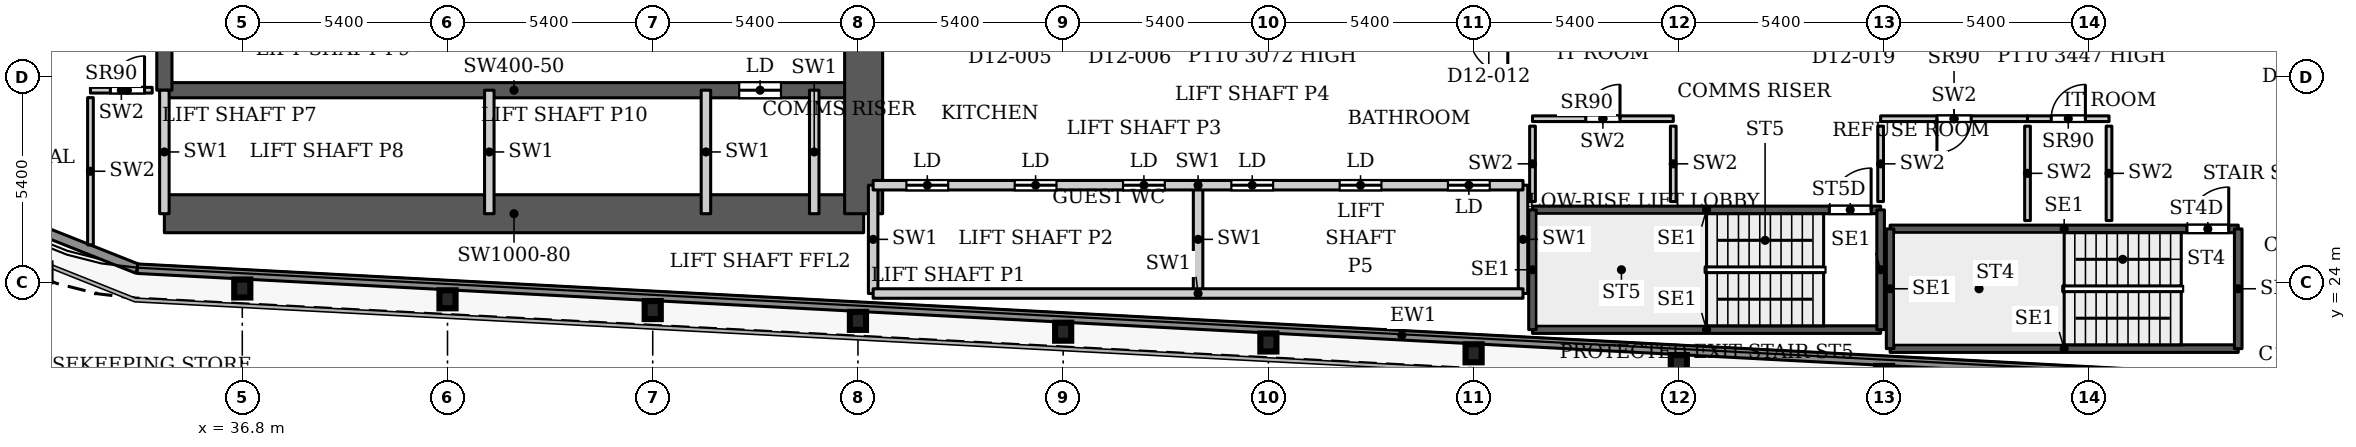
"""IFC4 building model, lengths in metres.
Left out: names, types, materials, properties, quantities, classifications, styles, units other than length and angle.
Written with IfcOpenShell. Run it as: python <this file> out.ifc"""

import sys

from ifc_helpers import new_model, si_unit, direction, frame, frame_2d, origin, origin_2d, place, context, subcontext, project, spatial, rectangle, i_section, extrude, source, transform, mapped, element, fill, save


model = new_model("IFC4")
c1 = context("Model", 3, precision=1e-05, world=origin(), true_north=direction((0.0, 1.0)))
c2 = subcontext(c1, "Body", "Model", "MODEL_VIEW")
j1 = project(units=[si_unit("LENGTHUNIT", "METRE"), si_unit("PLANEANGLEUNIT", "RADIAN")], contexts=[c1])
p1 = place(None, origin())
s1 = spatial("IfcSite", under=j1, at=p1, CompositionType="ELEMENT")
p2 = place(p1, origin())
s2 = spatial("IfcBuilding", under=s1, at=p2, CompositionType="ELEMENT")
p3 = place(p2, frame((0.0, 0.0, 57.8)))
s3 = spatial("IfcBuildingStorey", under=s2, at=p3, CompositionType="ELEMENT", Elevation=57.8)
for number, where, z_axis, x_axis in (
    (1, (80.0, 21.558, 0.0), (0.0, 0.0, 1.0), (1.0, 0.0, 0.0)),
    (2, (74.6, 21.843, 0.0), (0.0, 0.0, 1.0), (1.0, 0.0, 0.0)),
    (3, (69.2, 22.127, 0.0), (0.0, 0.0, 1.0), (1.0, 0.0, 0.0)),
    (4, (63.8, 22.411, 0.0), (0.0, 0.0, 1.0), (1.0, 0.0, 0.0)),
    (5, (58.4, 22.695, 0.0), (0.0, 0.0, 1.0), (1.0, 0.0, 0.0)),
    (6, (53.0, 22.98, 0.0), (0.0, 0.0, 1.0), (1.0, 0.0, 0.0)),
    (7, (47.6, 23.264, 0.0), (0.0, 0.0, 1.0), (1.0, 0.0, 0.0)),
    (8, (42.2, 23.548, 0.0), (0.0, 0.0, 1.0), (1.0, 0.0, 0.0)),
    (9, (36.8, 23.832, 0.0), (0.0, 0.0, 1.0), (1.0, 0.0, 0.0)),
):
    element("IfcColumn", number, at=place(p3, frame(where, z_axis=z_axis, x_axis=x_axis)), inside=s3, PredefinedType="COLUMN", context=c2, shape_type="SweptSolid", body=[
        extrude(i_section(OverallWidth=0.424, OverallDepth=0.474, WebThickness=0.048, FlangeThickness=0.077, FilletRadius=0.014, at=origin_2d()), origin(), (0.0, 0.0, 1.0), 3.9),
    ])
p4 = place(p3, frame((34.75, 25.8, 0.0), z_axis=(0.0, 0.0, 1.0), x_axis=(1.0, 0.0, 0.0)))
e10 = element("IfcWall", 10, at=p4, inside=s3, PredefinedType="SHEAR", context=c2, shape_type="SweptSolid", body=[
    extrude(rectangle(XDim=18.4, YDim=1.0, at=frame_2d((9.2, 0.0))), origin(), (0.0, 0.0, 1.0), 3.9),
])
p5 = place(p3, frame((34.75, 29.05, 0.0), z_axis=(0.0, 0.0, 1.0), x_axis=(1.0, 0.0, 0.0)))
e11 = element("IfcWall", 11, at=p5, inside=s3, PredefinedType="SHEAR", context=c2, shape_type="SweptSolid", body=[
    extrude(rectangle(XDim=18.4, YDim=0.4, at=frame_2d((9.2, 0.0))), origin(), (0.0, 0.0, 1.0), 3.9),
])
p6 = place(p5, frame((15.125, 0.0, 0.0)))
e12 = element("IfcOpeningElement", 12, at=p6, cuts=e11, PredefinedType="OPENING", context=c2, shape_type="SweptSolid", body=[
    extrude(rectangle(XDim=1.1, YDim=2.2, at=frame_2d((0.55, 1.1))), frame((0.0, 0.21, 0.0), z_axis=(0.0, -1.0, 0.0), x_axis=(1.0, 0.0, 0.0)), (0.0, 0.0, 1.0), 0.42),
])
p7 = place(p3, frame((34.75, 29.05, 0.0), z_axis=(0.0, 0.0, 1.0), x_axis=(0.0, 1.0, 0.0)))
e13 = element("IfcWall", 13, at=p7, inside=s3, PredefinedType="SHEAR", context=c2, shape_type="SweptSolid", body=[
    extrude(rectangle(XDim=18.45, YDim=0.4, at=frame_2d((9.225, 0.0))), origin(), (0.0, 0.0, 1.0), 3.9),
])
p8 = place(p7, frame((8.025, 0.0, 0.0)))
e14 = element("IfcOpeningElement", 14, at=p8, cuts=e13, PredefinedType="OPENING", context=c2, shape_type="SweptSolid", body=[
    extrude(rectangle(XDim=1.1, YDim=2.2, at=frame_2d((0.55, 1.1))), frame((0.0, 0.21, 0.0), z_axis=(0.0, -1.0, 0.0), x_axis=(1.0, 0.0, 0.0)), (0.0, 0.0, 1.0), 0.42),
])
p9 = place(p7, frame((10.875, 0.0, 0.0)))
e15 = element("IfcOpeningElement", 15, at=p9, cuts=e13, PredefinedType="OPENING", context=c2, shape_type="SweptSolid", body=[
    extrude(rectangle(XDim=1.1, YDim=2.2, at=frame_2d((0.55, 1.1))), frame((0.0, 0.21, 0.0), z_axis=(0.0, -1.0, 0.0), x_axis=(1.0, 0.0, 0.0)), (0.0, 0.0, 1.0), 0.42),
])
p10 = place(p7, frame((13.725, 0.0, 0.0)))
e16 = element("IfcOpeningElement", 16, at=p10, cuts=e13, PredefinedType="OPENING", context=c2, shape_type="SweptSolid", body=[
    extrude(rectangle(XDim=1.1, YDim=2.2, at=frame_2d((0.55, 1.1))), frame((0.0, 0.21, 0.0), z_axis=(0.0, -1.0, 0.0), x_axis=(1.0, 0.0, 0.0)), (0.0, 0.0, 1.0), 0.42),
])
p11 = place(p7, frame((15.95, 0.0, 0.0)))
e17 = element("IfcOpeningElement", 17, at=p11, cuts=e13, PredefinedType="OPENING", context=c2, shape_type="SweptSolid", body=[
    extrude(rectangle(XDim=1.1, YDim=2.2, at=frame_2d((0.55, 1.1))), frame((0.0, 0.21, 0.0), z_axis=(0.0, -1.0, 0.0), x_axis=(1.0, 0.0, 0.0)), (0.0, 0.0, 1.0), 0.42),
])
p12 = place(p3, frame((53.15, 25.8, 0.0), z_axis=(0.0, 0.0, 1.0), x_axis=(0.0, 1.0, 0.0)))
e18 = element("IfcWall", 18, at=p12, inside=s3, PredefinedType="SHEAR", context=c2, shape_type="SweptSolid", body=[
    extrude(rectangle(XDim=10.4, YDim=1.0, at=frame_2d((5.2, 0.0))), origin(), (0.0, 0.0, 1.0), 3.9),
])
p13 = place(p3, frame((34.039, 24.353, 0.0), z_axis=(0.0, 0.0, 1.0), x_axis=(-0.929352825399, 0.369192803184, 0.0)))
e19 = element("IfcWall", 19, at=p13, inside=s3, PredefinedType="SOLIDWALL", context=c2, shape_type="SweptSolid", body=[
    extrude(rectangle(XDim=4.656, YDim=0.25, at=frame_2d((2.328, 0.0))), origin(), (0.0, 0.0, 1.0), 3.75),
])
p14 = place(p3, frame((100.586, 20.85, 0.0), z_axis=(0.0, 0.0, 1.0), x_axis=(-0.99861746497, 0.052565755559, 0.0)))
e20 = element("IfcWall", 20, at=p14, inside=s3, PredefinedType="SOLIDWALL", context=c2, shape_type="SweptSolid", body=[
    extrude(rectangle(XDim=66.639, YDim=0.25, at=frame_2d((33.319, 0.0))), origin(), (0.0, 0.0, 1.0), 3.75),
])
p15 = place(p3, frame((80.16, 22.25, 0.0), z_axis=(0.0, 0.0, 1.0), x_axis=(1.0, 0.0, 0.0)))
e21 = element("IfcWall", 21, at=p15, inside=s3, PredefinedType="SHEAR", context=c2, shape_type="SweptSolid", body=[
    extrude(rectangle(XDim=9.16, YDim=0.2, at=frame_2d((4.58, 0.0))), origin(), (0.0, 0.0, 1.0), 3.9),
])
p16 = place(p3, frame((80.16, 25.4, 0.0), z_axis=(0.0, 0.0, 1.0), x_axis=(1.0, 0.0, 0.0)))
e22 = element("IfcWall", 22, at=p16, inside=s3, PredefinedType="SHEAR", context=c2, shape_type="SweptSolid", body=[
    extrude(rectangle(XDim=9.16, YDim=0.2, at=frame_2d((4.58, 0.0))), origin(), (0.0, 0.0, 1.0), 3.9),
])
p17 = place(p16, frame((7.81, 0.0, 0.0)))
e23 = element("IfcOpeningElement", 23, at=p17, cuts=e22, PredefinedType="OPENING", context=c2, shape_type="SweptSolid", body=[
    extrude(rectangle(XDim=1.1, YDim=2.2, at=frame_2d((0.55, 1.1))), frame((0.0, 0.11, 0.0), z_axis=(0.0, -1.0, 0.0), x_axis=(1.0, 0.0, 0.0)), (0.0, 0.0, 1.0), 0.22),
])
for number, where, z_axis, x_axis in (
    (24, (80.16, 22.25, 0.0), (0.0, 0.0, 1.0), (0.0, 1.0, 0.0)),
    (25, (89.32, 22.25, 0.0), (0.0, 0.0, 1.0), (0.0, 1.0, 0.0)),
):
    element("IfcWall", number, at=place(p3, frame(where, z_axis=z_axis, x_axis=x_axis)), inside=s3, PredefinedType="SHEAR", context=c2, shape_type="SweptSolid", body=[
        extrude(rectangle(XDim=3.15, YDim=0.2, at=frame_2d((1.575, 0.0))), origin(), (0.0, 0.0, 1.0), 3.9),
    ])
p18 = place(p3, frame((70.75, 22.75, 0.0), z_axis=(0.0, 0.0, 1.0), x_axis=(1.0, 0.0, 0.0)))
e26 = element("IfcWall", 26, at=p18, inside=s3, PredefinedType="SHEAR", context=c2, shape_type="SweptSolid", body=[
    extrude(rectangle(XDim=9.16, YDim=0.2, at=frame_2d((4.58, 0.0))), origin(), (0.0, 0.0, 1.0), 3.9),
])
p19 = place(p3, frame((70.75, 25.9, 0.0), z_axis=(0.0, 0.0, 1.0), x_axis=(1.0, 0.0, 0.0)))
e27 = element("IfcWall", 27, at=p19, inside=s3, PredefinedType="SHEAR", context=c2, shape_type="SweptSolid", body=[
    extrude(rectangle(XDim=9.16, YDim=0.2, at=frame_2d((4.58, 0.0))), origin(), (0.0, 0.0, 1.0), 3.9),
])
p20 = place(p19, frame((7.81, 0.0, 0.0)))
e28 = element("IfcOpeningElement", 28, at=p20, cuts=e27, PredefinedType="OPENING", context=c2, shape_type="SweptSolid", body=[
    extrude(rectangle(XDim=1.1, YDim=2.2, at=frame_2d((0.55, 1.1))), frame((0.0, 0.11, 0.0), z_axis=(0.0, -1.0, 0.0), x_axis=(1.0, 0.0, 0.0)), (0.0, 0.0, 1.0), 0.22),
])
for number, where, z_axis, x_axis in (
    (29, (70.75, 22.75, 0.0), (0.0, 0.0, 1.0), (0.0, 1.0, 0.0)),
    (30, (79.91, 22.75, 0.0), (0.0, 0.0, 1.0), (0.0, 1.0, 0.0)),
):
    element("IfcWall", number, at=place(p3, frame(where, z_axis=z_axis, x_axis=x_axis)), inside=s3, PredefinedType="SHEAR", context=c2, shape_type="SweptSolid", body=[
        extrude(rectangle(XDim=3.15, YDim=0.2, at=frame_2d((1.575, 0.0))), origin(), (0.0, 0.0, 1.0), 3.9),
    ])
for number, where, z_axis, x_axis in (
    (31, (34.75, 25.8, 0.0), (0.0, 0.0, 1.0), (0.0, 1.0, 0.0)),
    (32, (43.3, 25.8, 0.0), (0.0, 0.0, 1.0), (0.0, 1.0, 0.0)),
    (33, (49.0, 25.8, 0.0), (0.0, 0.0, 1.0), (0.0, 1.0, 0.0)),
    (34, (51.85, 25.8, 0.0), (0.0, 0.0, 1.0), (0.0, 1.0, 0.0)),
):
    element("IfcWall", number, at=place(p3, frame(where, z_axis=z_axis, x_axis=x_axis)), inside=s3, PredefinedType="PARTITIONING", context=c2, shape_type="SweptSolid", body=[
        extrude(rectangle(XDim=3.25, YDim=0.25, at=frame_2d((1.625, 0.0))), origin(), (0.0, 0.0, 1.0), 3.9),
    ])
for number, where, z_axis, x_axis in (
    (35, (53.4, 23.7, 0.0), (0.0, 0.0, 1.0), (0.0, 1.0, 0.0)),
    (36, (61.95, 23.7, 0.0), (0.0, 0.0, 1.0), (0.0, 1.0, 0.0)),
    (37, (70.5, 23.7, 0.0), (0.0, 0.0, 1.0), (0.0, 1.0, 0.0)),
):
    element("IfcWall", number, at=place(p3, frame(where, z_axis=z_axis, x_axis=x_axis)), inside=s3, PredefinedType="PARTITIONING", context=c2, shape_type="SweptSolid", body=[
        extrude(rectangle(XDim=2.85, YDim=0.25, at=frame_2d((1.425, 0.0))), origin(), (0.0, 0.0, 1.0), 3.9),
    ])
p21 = place(p3, frame((53.4, 23.7, 0.0), z_axis=(0.0, 0.0, 1.0), x_axis=(1.0, 0.0, 0.0)))
e38 = element("IfcWall", 38, at=p21, inside=s3, PredefinedType="PARTITIONING", context=c2, shape_type="SweptSolid", body=[
    extrude(rectangle(XDim=17.1, YDim=0.25, at=frame_2d((8.55, 0.0))), origin(), (0.0, 0.0, 1.0), 3.9),
])
p22 = place(p3, frame((53.4, 26.55, 0.0), z_axis=(0.0, 0.0, 1.0), x_axis=(1.0, 0.0, 0.0)))
e39 = element("IfcWall", 39, at=p22, inside=s3, PredefinedType="PARTITIONING", context=c2, shape_type="SweptSolid", body=[
    extrude(rectangle(XDim=17.1, YDim=0.25, at=frame_2d((8.55, 0.0))), origin(), (0.0, 0.0, 1.0), 3.9),
])
p23 = place(p22, frame((0.875, 0.0, 0.0)))
e40 = element("IfcOpeningElement", 40, at=p23, cuts=e39, PredefinedType="OPENING", context=c2, shape_type="SweptSolid", body=[
    extrude(rectangle(XDim=1.1, YDim=2.2, at=frame_2d((0.55, 1.1))), frame((0.0, 0.135, 0.0), z_axis=(0.0, -1.0, 0.0), x_axis=(1.0, 0.0, 0.0)), (0.0, 0.0, 1.0), 0.27),
])
p24 = place(p22, frame((3.725, 0.0, 0.0)))
e41 = element("IfcOpeningElement", 41, at=p24, cuts=e39, PredefinedType="OPENING", context=c2, shape_type="SweptSolid", body=[
    extrude(rectangle(XDim=1.1, YDim=2.2, at=frame_2d((0.55, 1.1))), frame((0.0, 0.135, 0.0), z_axis=(0.0, -1.0, 0.0), x_axis=(1.0, 0.0, 0.0)), (0.0, 0.0, 1.0), 0.27),
])
p25 = place(p22, frame((6.575, 0.0, 0.0)))
e42 = element("IfcOpeningElement", 42, at=p25, cuts=e39, PredefinedType="OPENING", context=c2, shape_type="SweptSolid", body=[
    extrude(rectangle(XDim=1.1, YDim=2.2, at=frame_2d((0.55, 1.1))), frame((0.0, 0.135, 0.0), z_axis=(0.0, -1.0, 0.0), x_axis=(1.0, 0.0, 0.0)), (0.0, 0.0, 1.0), 0.27),
])
p26 = place(p22, frame((9.425, 0.0, 0.0)))
e43 = element("IfcOpeningElement", 43, at=p26, cuts=e39, PredefinedType="OPENING", context=c2, shape_type="SweptSolid", body=[
    extrude(rectangle(XDim=1.1, YDim=2.2, at=frame_2d((0.55, 1.1))), frame((0.0, 0.135, 0.0), z_axis=(0.0, -1.0, 0.0), x_axis=(1.0, 0.0, 0.0)), (0.0, 0.0, 1.0), 0.27),
])
p27 = place(p22, frame((12.275, 0.0, 0.0)))
e44 = element("IfcOpeningElement", 44, at=p27, cuts=e39, PredefinedType="OPENING", context=c2, shape_type="SweptSolid", body=[
    extrude(rectangle(XDim=1.1, YDim=2.2, at=frame_2d((0.55, 1.1))), frame((0.0, 0.135, 0.0), z_axis=(0.0, -1.0, 0.0), x_axis=(1.0, 0.0, 0.0)), (0.0, 0.0, 1.0), 0.27),
])
p28 = place(p22, frame((15.125, 0.0, 0.0)))
e45 = element("IfcOpeningElement", 45, at=p28, cuts=e39, PredefinedType="OPENING", context=c2, shape_type="SweptSolid", body=[
    extrude(rectangle(XDim=1.1, YDim=2.2, at=frame_2d((0.55, 1.1))), frame((0.0, 0.135, 0.0), z_axis=(0.0, -1.0, 0.0), x_axis=(1.0, 0.0, 0.0)), (0.0, 0.0, 1.0), 0.27),
])
p29 = place(p3, frame((32.805, 29.05, 0.0), z_axis=(0.0, 0.0, 1.0), x_axis=(1.0, 0.0, 0.0)))
e46 = element("IfcWall", 46, at=p29, inside=s3, PredefinedType="PARTITIONING", context=c2, shape_type="SweptSolid", body=[
    extrude(rectangle(XDim=1.625, YDim=0.15, at=frame_2d((0.812, 0.0))), origin(), (0.0, 0.0, 1.0), 3.9),
])
p30 = place(p29, frame((0.523, 0.0, 0.0)))
e47 = element("IfcOpeningElement", 47, at=p30, cuts=e46, PredefinedType="OPENING", context=c2, shape_type="SweptSolid", body=[
    extrude(rectangle(XDim=0.9, YDim=2.2, at=frame_2d((0.45, 1.1))), frame((0.0, 0.085, 0.0), z_axis=(0.0, -1.0, 0.0), x_axis=(1.0, 0.0, 0.0)), (0.0, 0.0, 1.0), 0.17),
])
p31 = place(p3, frame((32.805, 24.98, 0.0), z_axis=(0.0, 0.0, 1.0), x_axis=(0.0, 1.0, 0.0)))
e48 = element("IfcWall", 48, at=p31, inside=s3, PredefinedType="PARTITIONING", context=c2, shape_type="SweptSolid", body=[
    extrude(rectangle(XDim=3.875, YDim=0.15, at=frame_2d((1.938, 0.0))), origin(), (0.0, 0.0, 1.0), 3.9),
])
p32 = place(p3, frame((70.75, 28.3, 0.0), z_axis=(0.0, 0.0, 1.0), x_axis=(1.0, 0.0, 0.0)))
e49 = element("IfcWall", 49, at=p32, inside=s3, PredefinedType="PARTITIONING", context=c2, shape_type="SweptSolid", body=[
    extrude(rectangle(XDim=3.704, YDim=0.15, at=frame_2d((1.852, 0.0))), origin(), (0.0, 0.0, 1.0), 3.9),
])
p33 = place(p32, frame((1.402, 0.0, 0.0)))
e50 = element("IfcOpeningElement", 50, at=p33, cuts=e49, PredefinedType="OPENING", context=c2, shape_type="SweptSolid", body=[
    extrude(rectangle(XDim=0.9, YDim=2.2, at=frame_2d((0.45, 1.1))), frame((0.0, 0.085, 0.0), z_axis=(0.0, -1.0, 0.0), x_axis=(1.0, 0.0, 0.0)), (0.0, 0.0, 1.0), 0.17),
])
for number, where, z_axis, x_axis in (
    (51, (70.75, 26.12, 0.0), (0.0, 0.0, 1.0), (0.0, 1.0, 0.0)),
    (52, (74.454, 26.12, 0.0), (0.0, 0.0, 1.0), (0.0, 1.0, 0.0)),
):
    element("IfcWall", number, at=place(p3, frame(where, z_axis=z_axis, x_axis=x_axis)), inside=s3, PredefinedType="PARTITIONING", context=c2, shape_type="SweptSolid", body=[
        extrude(rectangle(XDim=1.985, YDim=0.15, at=frame_2d((0.992, 0.0))), origin(), (0.0, 0.0, 1.0), 3.9),
    ])
p34 = place(p3, frame((79.91, 28.3, 0.0), z_axis=(0.0, 0.0, 1.0), x_axis=(1.0, 0.0, 0.0)))
e53 = element("IfcWall", 53, at=p34, inside=s3, PredefinedType="PARTITIONING", context=c2, shape_type="SweptSolid", body=[
    extrude(rectangle(XDim=3.865, YDim=0.15, at=frame_2d((1.933, 0.0))), origin(), (0.0, 0.0, 1.0), 3.9),
])
p35 = place(p34, frame((1.482, 0.0, 0.0)))
e54 = element("IfcOpeningElement", 54, at=p35, cuts=e53, PredefinedType="OPENING", context=c2, shape_type="SweptSolid", body=[
    extrude(rectangle(XDim=0.9, YDim=2.2, at=frame_2d((0.45, 1.1))), frame((0.0, 0.085, 0.0), z_axis=(0.0, -1.0, 0.0), x_axis=(1.0, 0.0, 0.0)), (0.0, 0.0, 1.0), 0.17),
])
p36 = place(p3, frame((79.91, 26.12, 0.0), z_axis=(0.0, 0.0, 1.0), x_axis=(0.0, 1.0, 0.0)))
e55 = element("IfcWall", 55, at=p36, inside=s3, PredefinedType="PARTITIONING", context=c2, shape_type="SweptSolid", body=[
    extrude(rectangle(XDim=1.985, YDim=0.15, at=frame_2d((0.992, 0.0))), origin(), (0.0, 0.0, 1.0), 3.9),
])
p37 = place(p3, frame((83.775, 25.62, 0.0), z_axis=(0.0, 0.0, 1.0), x_axis=(0.0, 1.0, 0.0)))
e56 = element("IfcWall", 56, at=p37, inside=s3, PredefinedType="PARTITIONING", context=c2, shape_type="SweptSolid", body=[
    extrude(rectangle(XDim=2.485, YDim=0.15, at=frame_2d((1.242, 0.0))), origin(), (0.0, 0.0, 1.0), 3.9),
])
p38 = place(p3, frame((83.775, 28.3, 0.0), z_axis=(0.0, 0.0, 1.0), x_axis=(1.0, 0.0, 0.0)))
e57 = element("IfcWall", 57, at=p38, inside=s3, PredefinedType="PARTITIONING", context=c2, shape_type="SweptSolid", body=[
    extrude(rectangle(XDim=2.145, YDim=0.15, at=frame_2d((1.073, 0.0))), origin(), (0.0, 0.0, 1.0), 3.9),
])
p39 = place(p38, frame((0.623, 0.0, 0.0)))
e58 = element("IfcOpeningElement", 58, at=p39, cuts=e57, PredefinedType="OPENING", context=c2, shape_type="SweptSolid", body=[
    extrude(rectangle(XDim=0.9, YDim=2.2, at=frame_2d((0.45, 1.1))), frame((0.0, 0.085, 0.0), z_axis=(0.0, -1.0, 0.0), x_axis=(1.0, 0.0, 0.0)), (0.0, 0.0, 1.0), 0.17),
])
p40 = place(p3, frame((85.92, 25.62, 0.0), z_axis=(0.0, 0.0, 1.0), x_axis=(0.0, 1.0, 0.0)))
e59 = element("IfcWall", 59, at=p40, inside=s3, PredefinedType="PARTITIONING", context=c2, shape_type="SweptSolid", body=[
    extrude(rectangle(XDim=2.485, YDim=0.15, at=frame_2d((1.242, 0.0))), origin(), (0.0, 0.0, 1.0), 3.9),
])
m1 = source(origin(), c2, "Body", "SweptSolid", [
    extrude(rectangle(XDim=1.1, YDim=2.2, at=frame_2d((0.55, 1.1))), frame((0.0, 0.025, 0.0), z_axis=(0.0, -1.0, 0.0), x_axis=(1.0, 0.0, 0.0)), (0.0, 0.0, 1.0), 0.05),
])
p41 = place(p23, origin())
e60 = element("IfcDoor", 60, at=p41, inside=s3, OperationType="SLIDING_TO_LEFT", PredefinedType="DOOR", context=c2, shape_type="MappedRepresentation", body=[
    mapped(m1, transform((0.0, 0.0, 0.0), x_axis=(1.0, 0.0, 0.0), y_axis=(0.0, 1.0, 0.0), z_axis=(0.0, 0.0, 1.0), scale=1.0)),
])
fill(e40, e60)
p42 = place(p24, origin())
e61 = element("IfcDoor", 61, at=p42, inside=s3, OperationType="SLIDING_TO_LEFT", PredefinedType="DOOR", context=c2, shape_type="MappedRepresentation", body=[
    mapped(m1, transform((0.0, 0.0, 0.0), x_axis=(1.0, 0.0, 0.0), y_axis=(0.0, 1.0, 0.0), z_axis=(0.0, 0.0, 1.0), scale=1.0)),
])
fill(e41, e61)
p43 = place(p25, origin())
e62 = element("IfcDoor", 62, at=p43, inside=s3, OperationType="SLIDING_TO_LEFT", PredefinedType="DOOR", context=c2, shape_type="MappedRepresentation", body=[
    mapped(m1, transform((0.0, 0.0, 0.0), x_axis=(1.0, 0.0, 0.0), y_axis=(0.0, 1.0, 0.0), z_axis=(0.0, 0.0, 1.0), scale=1.0)),
])
fill(e42, e62)
p44 = place(p26, origin())
e63 = element("IfcDoor", 63, at=p44, inside=s3, OperationType="SLIDING_TO_LEFT", PredefinedType="DOOR", context=c2, shape_type="MappedRepresentation", body=[
    mapped(m1, transform((0.0, 0.0, 0.0), x_axis=(1.0, 0.0, 0.0), y_axis=(0.0, 1.0, 0.0), z_axis=(0.0, 0.0, 1.0), scale=1.0)),
])
fill(e43, e63)
p45 = place(p27, origin())
e64 = element("IfcDoor", 64, at=p45, inside=s3, OperationType="SLIDING_TO_LEFT", PredefinedType="DOOR", context=c2, shape_type="MappedRepresentation", body=[
    mapped(m1, transform((0.0, 0.0, 0.0), x_axis=(1.0, 0.0, 0.0), y_axis=(0.0, 1.0, 0.0), z_axis=(0.0, 0.0, 1.0), scale=1.0)),
])
fill(e44, e64)
p46 = place(p28, origin())
e65 = element("IfcDoor", 65, at=p46, inside=s3, OperationType="SLIDING_TO_LEFT", PredefinedType="DOOR", context=c2, shape_type="MappedRepresentation", body=[
    mapped(m1, transform((0.0, 0.0, 0.0), x_axis=(1.0, 0.0, 0.0), y_axis=(0.0, 1.0, 0.0), z_axis=(0.0, 0.0, 1.0), scale=1.0)),
])
fill(e45, e65)
p47 = place(p6, origin())
e66 = element("IfcDoor", 66, at=p47, inside=s3, OperationType="SLIDING_TO_LEFT", PredefinedType="DOOR", context=c2, shape_type="MappedRepresentation", body=[
    mapped(m1, transform((0.0, 0.0, 0.0), x_axis=(1.0, 0.0, 0.0), y_axis=(0.0, 1.0, 0.0), z_axis=(0.0, 0.0, 1.0), scale=1.0)),
])
fill(e12, e66)
m2 = source(origin(), c2, "Body", "SweptSolid", [
    extrude(rectangle(XDim=0.9, YDim=2.2, at=frame_2d((0.45, 1.1))), frame((0.0, 0.025, 0.0), z_axis=(0.0, -1.0, 0.0), x_axis=(1.0, 0.0, 0.0)), (0.0, 0.0, 1.0), 0.05),
])
p48 = place(p30, origin())
e67 = element("IfcDoor", 67, at=p48, inside=s3, OperationType="SINGLE_SWING_LEFT", PredefinedType="DOOR", context=c2, shape_type="MappedRepresentation", body=[
    mapped(m2, transform((0.0, 0.0, 0.0), x_axis=(1.0, 0.0, 0.0), y_axis=(0.0, 1.0, 0.0), z_axis=(0.0, 0.0, 1.0), scale=1.0)),
])
fill(e47, e67)
p49 = place(p33, origin())
e68 = element("IfcDoor", 68, at=p49, inside=s3, OperationType="SINGLE_SWING_LEFT", PredefinedType="DOOR", context=c2, shape_type="MappedRepresentation", body=[
    mapped(m2, transform((0.0, 0.0, 0.0), x_axis=(1.0, 0.0, 0.0), y_axis=(0.0, 1.0, 0.0), z_axis=(0.0, 0.0, 1.0), scale=1.0)),
])
fill(e50, e68)
p50 = place(p35, origin())
e69 = element("IfcDoor", 69, at=p50, inside=s3, OperationType="SINGLE_SWING_RIGHT", PredefinedType="DOOR", context=c2, shape_type="MappedRepresentation", body=[
    mapped(m2, transform((0.0, 0.0, 0.0), x_axis=(1.0, 0.0, 0.0), y_axis=(0.0, 1.0, 0.0), z_axis=(0.0, 0.0, 1.0), scale=1.0)),
])
fill(e54, e69)
p51 = place(p39, origin())
e70 = element("IfcDoor", 70, at=p51, inside=s3, OperationType="SINGLE_SWING_LEFT", PredefinedType="DOOR", context=c2, shape_type="MappedRepresentation", body=[
    mapped(m2, transform((0.0, 0.0, 0.0), x_axis=(1.0, 0.0, 0.0), y_axis=(0.0, 1.0, 0.0), z_axis=(0.0, 0.0, 1.0), scale=1.0)),
])
fill(e58, e70)
m3 = source(origin(), c2, "Body", "SweptSolid", [
    extrude(rectangle(XDim=1.1, YDim=2.2, at=frame_2d((0.55, 1.1))), frame((0.0, 0.025, 0.0), z_axis=(0.0, -1.0, 0.0), x_axis=(1.0, 0.0, 0.0)), (0.0, 0.0, 1.0), 0.05),
])
p52 = place(p17, origin())
e71 = element("IfcDoor", 71, at=p52, inside=s3, OperationType="SINGLE_SWING_LEFT", PredefinedType="DOOR", context=c2, shape_type="MappedRepresentation", body=[
    mapped(m3, transform((0.0, 0.0, 0.0), x_axis=(1.0, 0.0, 0.0), y_axis=(0.0, 1.0, 0.0), z_axis=(0.0, 0.0, 1.0), scale=1.0)),
])
fill(e23, e71)
p53 = place(p20, origin())
e72 = element("IfcDoor", 72, at=p53, inside=s3, OperationType="SINGLE_SWING_LEFT", PredefinedType="DOOR", context=c2, shape_type="MappedRepresentation", body=[
    mapped(m3, transform((0.0, 0.0, 0.0), x_axis=(1.0, 0.0, 0.0), y_axis=(0.0, 1.0, 0.0), z_axis=(0.0, 0.0, 1.0), scale=1.0)),
])
fill(e28, e72)
save(model, sys.argv[1])
